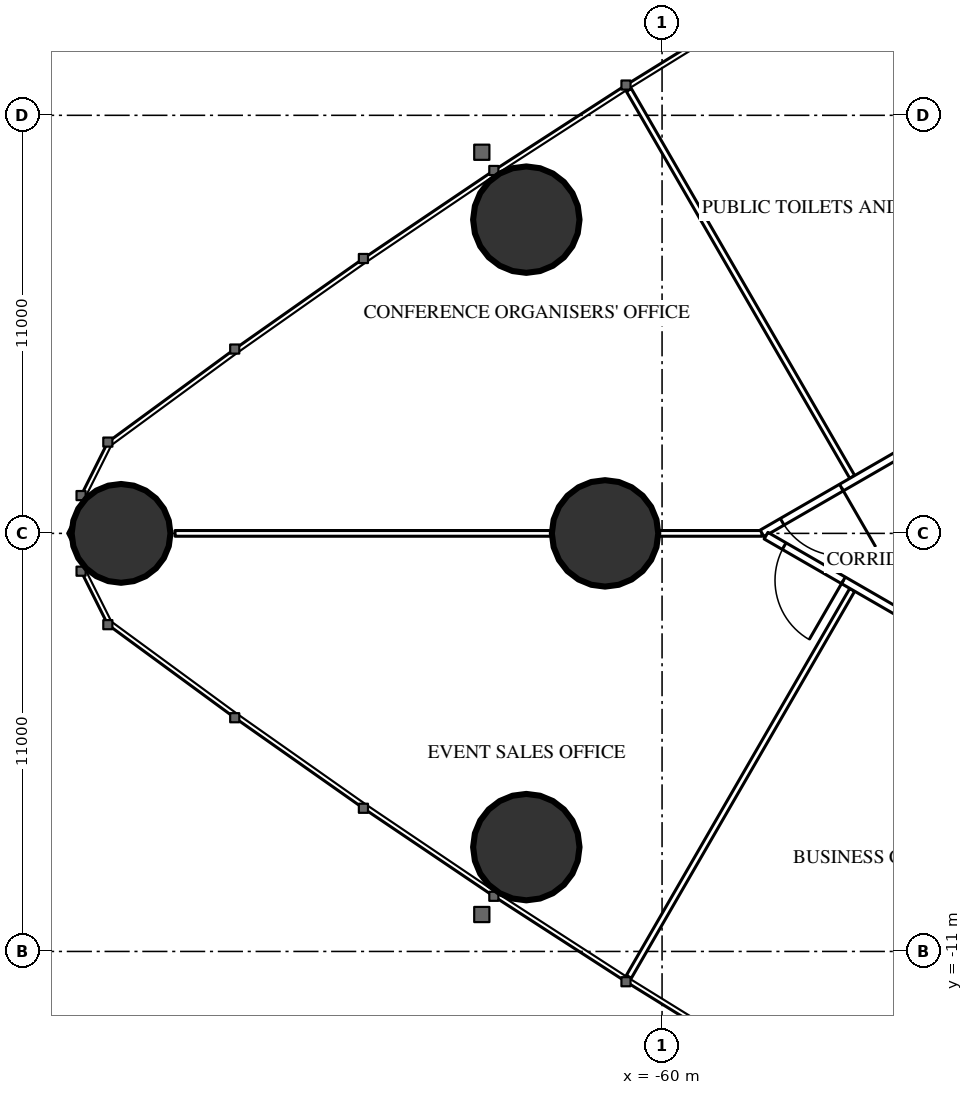
"""IFC4 building model, lengths in metres.
Left out: names, types, materials, properties, quantities, classifications, styles, units other than length and angle.
Written with IfcOpenShell. Run it as: python <this file> out.ifc"""

import sys

from ifc_helpers import new_model, si_unit, direction, frame, frame_2d, origin, origin_2d, place, context, subcontext, project, spatial, rectangle, hollow_circle, extrude, element, fill, save


model = new_model("IFC4")
c1 = context("Model", 3, precision=1e-05, world=origin(), true_north=direction((0.0, 1.0)))
c2 = subcontext(c1, "Body", "Model", "MODEL_VIEW")
j1 = project(units=[si_unit("LENGTHUNIT", "METRE"), si_unit("PLANEANGLEUNIT", "RADIAN")], contexts=[c1])
p1 = place(None, origin())
s1 = spatial("IfcSite", under=j1, at=p1, CompositionType="ELEMENT")
p2 = place(p1, origin())
s2 = spatial("IfcBuilding", under=s1, at=p2, CompositionType="ELEMENT")
p3 = place(p2, frame((0.0, 0.0, 7.2)))
s3 = spatial("IfcBuildingStorey", under=s2, at=p3, CompositionType="ELEMENT", Elevation=7.2)
p4 = place(p3, frame((-74.235, 0.0, 0.0), z_axis=(0.0, 0.0, 1.0), x_axis=(1.0, 0.0, 0.0)))
e1 = element("IfcColumn", 1, at=p4, inside=s3, PredefinedType="COLUMN", context=c2, shape_type="SweptSolid", body=[
    extrude(hollow_circle(Radius=1.3, WallThickness=0.1, at=origin_2d()), origin(), (0.0, 0.0, 1.0), 5.4),
])
for number, where, z_axis, x_axis in (
    (2, (-63.572, -8.255, 0.0), (0.0, 0.0, 1.0), (1.0, 0.0, 0.0)),
    (3, (-63.572, 8.255, 0.0), (0.0, 0.0, 1.0), (1.0, 0.0, 0.0)),
):
    element("IfcColumn", number, at=place(p3, frame(where, z_axis=z_axis, x_axis=x_axis)), inside=s3, PredefinedType="COLUMN", context=c2, shape_type="SweptSolid", body=[
        extrude(hollow_circle(Radius=1.4, WallThickness=0.12, at=origin_2d()), origin(), (0.0, 0.0, 1.0), 5.4),
    ])
p5 = place(p3, frame((-61.5, 0.0, 0.0), z_axis=(0.0, 0.0, 1.0), x_axis=(1.0, 0.0, 0.0)))
e4 = element("IfcColumn", 4, at=p5, inside=s3, PredefinedType="COLUMN", context=c2, shape_type="SweptSolid", body=[
    extrude(hollow_circle(Radius=1.4, WallThickness=0.1, at=origin_2d()), origin(), (0.0, 0.0, 1.0), 5.4),
])
for number, where, z_axis, x_axis in (
    (5, (-54.996, 1.485, 0.0), (0.0, 0.0, 1.0), (-0.5, 0.866, 0.0)),
    (6, (-54.996, -1.485, 0.0), (0.0, 0.0, 1.0), (-0.5, -0.866, 0.0)),
):
    element("IfcWall", number, at=place(p3, frame(where, z_axis=z_axis, x_axis=x_axis)), inside=s3, PredefinedType="PARTITIONING", context=c2, shape_type="SweptSolid", body=[
        extrude(rectangle(XDim=11.757, YDim=0.15, at=frame_2d((5.878, 0.0))), origin(), (0.0, 0.0, 1.0), 5.05),
    ])
p6 = place(p3, frame((-57.368, 0.0, 0.0), z_axis=(0.0, 0.0, 1.0), x_axis=(-1.0, 0.0, 0.0)))
e7 = element("IfcWall", 7, at=p6, inside=s3, PredefinedType="PARTITIONING", context=c2, shape_type="SweptSolid", body=[
    extrude(rectangle(XDim=15.447, YDim=0.15, at=frame_2d((7.724, 0.0))), origin(), (0.0, 0.0, 1.0), 4.05),
])
p7 = place(p3, frame((-37.9, 11.24, 0.0), z_axis=(0.0, 0.0, 1.0), x_axis=(-0.866022995118, -0.50000417191, 0.0)))
e8 = element("IfcWall", 8, at=p7, inside=s3, PredefinedType="PARTITIONING", context=c2, shape_type="SweptSolid", body=[
    extrude(rectangle(XDim=22.48, YDim=0.2, at=frame_2d((11.24, 0.0))), origin(), (0.0, 0.0, 1.0), 5.05),
])
p8 = place(p7, frame((14.644, 0.0, 0.0)))
e9 = element("IfcOpeningElement", 9, at=p8, cuts=e8, PredefinedType="OPENING", context=c2, shape_type="SweptSolid", body=[
    extrude(rectangle(XDim=1.8, YDim=2.2, at=frame_2d((0.9, 1.1))), frame((0.0, 0.11, 0.0), z_axis=(0.0, -1.0, 0.0), x_axis=(1.0, 0.0, 0.0)), (0.0, 0.0, 1.0), 0.22),
])
p9 = place(p7, frame((20.069, 0.0, 0.0)))
e10 = element("IfcOpeningElement", 10, at=p9, cuts=e8, PredefinedType="OPENING", context=c2, shape_type="SweptSolid", body=[
    extrude(rectangle(XDim=1.8, YDim=2.2, at=frame_2d((0.9, 1.1))), frame((0.0, 0.11, 0.0), z_axis=(0.0, -1.0, 0.0), x_axis=(1.0, 0.0, 0.0)), (0.0, 0.0, 1.0), 0.22),
])
p10 = place(p7, frame((4.915, 0.0, 0.0)))
e11 = element("IfcOpeningElement", 11, at=p10, cuts=e8, PredefinedType="OPENING", context=c2, shape_type="SweptSolid", body=[
    extrude(rectangle(XDim=1.8, YDim=2.2, at=frame_2d((0.9, 1.1))), frame((0.0, 0.11, 0.0), z_axis=(0.0, -1.0, 0.0), x_axis=(1.0, 0.0, 0.0)), (0.0, 0.0, 1.0), 0.22),
])
p11 = place(p3, frame((-37.12, -11.69, 0.0), z_axis=(0.0, 0.0, 1.0), x_axis=(-0.866028803602, 0.499994111297, 0.0)))
e12 = element("IfcWall", 12, at=p11, inside=s3, PredefinedType="PARTITIONING", context=c2, shape_type="SweptSolid", body=[
    extrude(rectangle(XDim=23.26, YDim=0.2, at=frame_2d((11.63, 0.0))), origin(), (0.0, 0.0, 1.0), 5.05),
])
p12 = place(p11, frame((20.909, 0.0, 0.0)))
e13 = element("IfcOpeningElement", 13, at=p12, cuts=e12, PredefinedType="OPENING", context=c2, shape_type="SweptSolid", body=[
    extrude(rectangle(XDim=1.8, YDim=2.2, at=frame_2d((0.9, 1.1))), frame((0.0, 0.11, 0.0), z_axis=(0.0, -1.0, 0.0), x_axis=(1.0, 0.0, 0.0)), (0.0, 0.0, 1.0), 0.22),
])
p13 = place(p11, frame((15.544, 0.0, 0.0)))
e14 = element("IfcOpeningElement", 14, at=p13, cuts=e12, PredefinedType="OPENING", context=c2, shape_type="SweptSolid", body=[
    extrude(rectangle(XDim=1.8, YDim=2.2, at=frame_2d((0.9, 1.1))), frame((0.0, 0.11, 0.0), z_axis=(0.0, -1.0, 0.0), x_axis=(1.0, 0.0, 0.0)), (0.0, 0.0, 1.0), 0.22),
])
p14 = place(p11, frame((5.365, 0.0, 0.0)))
e15 = element("IfcOpeningElement", 15, at=p14, cuts=e12, PredefinedType="OPENING", context=c2, shape_type="SweptSolid", body=[
    extrude(rectangle(XDim=1.8, YDim=2.2, at=frame_2d((0.9, 1.1))), frame((0.0, 0.11, 0.0), z_axis=(0.0, -1.0, 0.0), x_axis=(1.0, 0.0, 0.0)), (0.0, 0.0, 1.0), 0.22),
])
p15 = place(p9, origin())
e16 = element("IfcDoor", 16, at=p15, inside=s3, OperationType="DOUBLE_DOOR_SINGLE_SWING", PredefinedType="DOOR", context=c2, shape_type="SweptSolid", body=[
    extrude(rectangle(XDim=1.8, YDim=2.2, at=frame_2d((0.9, 1.1))), frame((0.0, 0.025, 0.0), z_axis=(0.0, -1.0, 0.0), x_axis=(1.0, 0.0, 0.0)), (0.0, 0.0, 1.0), 0.05),
])
fill(e10, e16)
p16 = place(p12, origin())
e17 = element("IfcDoor", 17, at=p16, inside=s3, OperationType="DOUBLE_DOOR_SINGLE_SWING", PredefinedType="DOOR", context=c2, shape_type="SweptSolid", body=[
    extrude(rectangle(XDim=1.8, YDim=2.2, at=frame_2d((0.9, 1.1))), frame((0.0, 0.025, 0.0), z_axis=(0.0, -1.0, 0.0), x_axis=(1.0, 0.0, 0.0)), (0.0, 0.0, 1.0), 0.05),
])
fill(e13, e17)
save(model, sys.argv[1])
